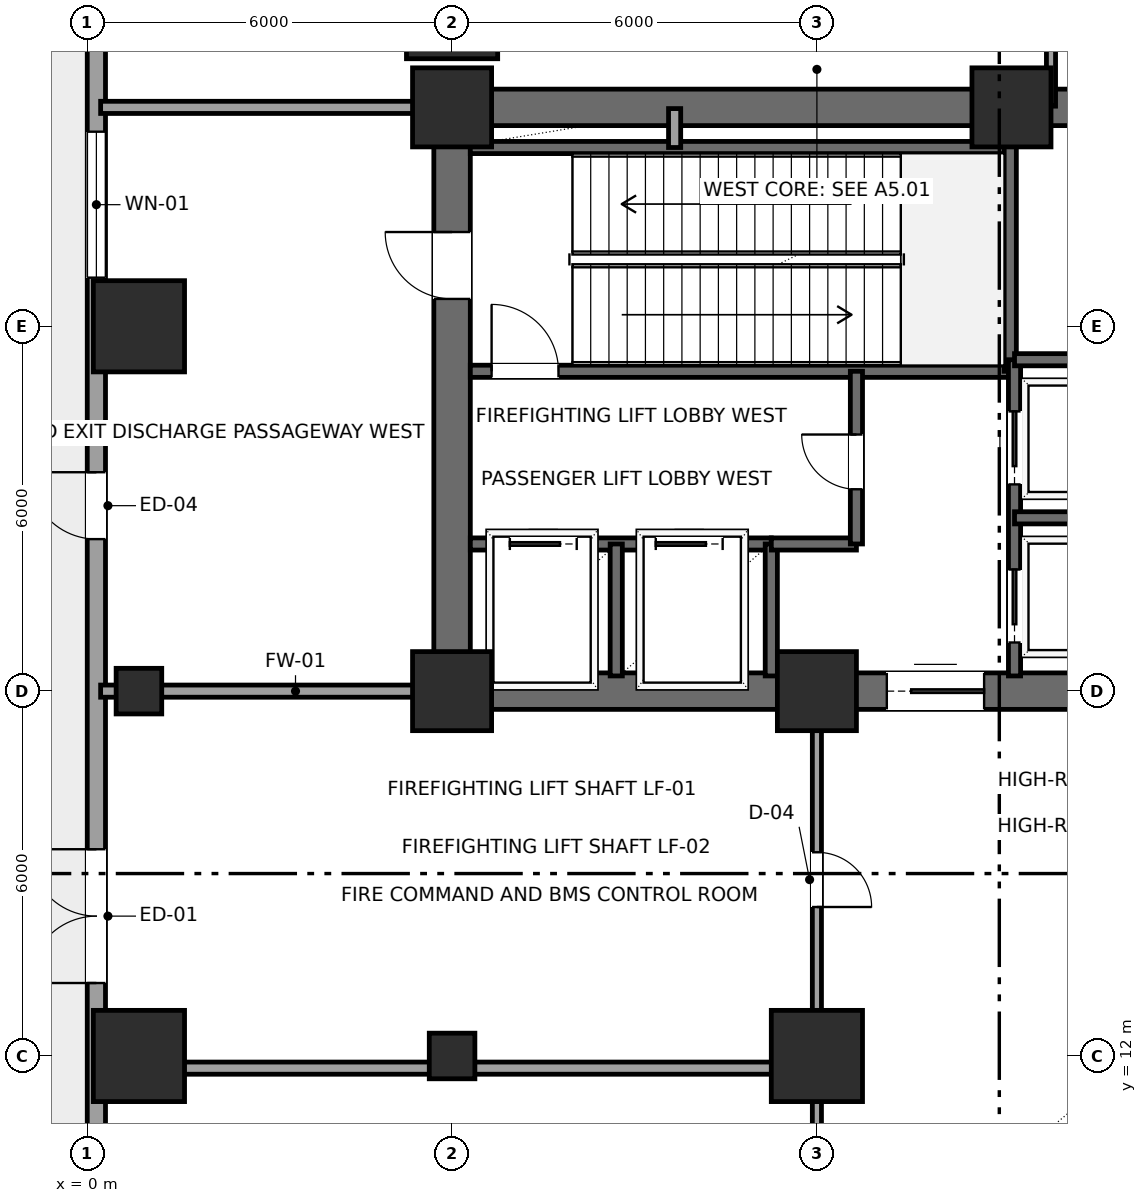
"""IFC4 building model, lengths in metres.
Left out: names, types, materials, properties, quantities, classifications, styles, units other than length and angle.
Written with IfcOpenShell. Run it as: python <this file> out.ifc"""

import sys

from ifc_helpers import new_model, si_unit, direction, frame, frame_2d, origin, origin_2d, place, context, subcontext, project, spatial, rectangle, hollow_rectangle, extrude, element, fill, save


model = new_model("IFC4")
c1 = context("Model", 3, precision=1e-05, world=origin(), true_north=direction((0.0, 1.0)))
c2 = subcontext(c1, "Body", "Model", "MODEL_VIEW")
j1 = project(units=[si_unit("LENGTHUNIT", "METRE"), si_unit("PLANEANGLEUNIT", "RADIAN")], contexts=[c1])
p1 = place(None, origin())
s1 = spatial("IfcSite", under=j1, at=p1, CompositionType="ELEMENT")
p2 = place(p1, origin())
s2 = spatial("IfcBuilding", under=s1, at=p2, CompositionType="ELEMENT")
p3 = place(p2, origin())
s3 = spatial("IfcBuildingStorey", under=s2, at=p3, CompositionType="ELEMENT", Elevation=0.0)
for number, where, z_axis, x_axis in (
    (1, (6.0, 18.0, 0.0), (0.0, 0.0, 1.0), (1.0, 0.0, 0.0)),
    (2, (12.0, 18.0, 0.0), (0.0, 0.0, 1.0), (1.0, 0.0, 0.0)),
    (3, (6.0, 27.6, 0.0), (0.0, 0.0, 1.0), (1.0, 0.0, 0.0)),
    (4, (15.2, 27.6, 0.0), (0.0, 0.0, 1.0), (1.0, 0.0, 0.0)),
):
    element("IfcColumn", number, at=place(p3, frame(where, z_axis=z_axis, x_axis=x_axis)), inside=s3, PredefinedType="COLUMN", context=c2, shape_type="SweptSolid", body=[
        extrude(rectangle(XDim=1.3, YDim=1.3, at=origin_2d()), origin(), (0.0, 0.0, 1.0), 5.7),
    ])
p4 = place(p3, frame((0.85, 12.0, 0.0), z_axis=(0.0, 0.0, 1.0), x_axis=(1.0, 0.0, 0.0)))
e5 = element("IfcColumn", 5, at=p4, inside=s3, PredefinedType="COLUMN", context=c2, shape_type="SweptSolid", body=[
    extrude(rectangle(XDim=1.5, YDim=1.5, at=origin_2d()), origin(), (0.0, 0.0, 1.0), 5.7),
])
p5 = place(p3, frame((0.85, 18.0, 0.0), z_axis=(0.0, 0.0, 1.0), x_axis=(1.0, 0.0, 0.0)))
e6 = element("IfcColumn", 6, at=p5, inside=s3, PredefinedType="COLUMN", context=c2, shape_type="SweptSolid", body=[
    extrude(hollow_rectangle(XDim=0.75, YDim=0.75, WallThickness=0.035, InnerFilletRadius=0.035, OuterFilletRadius=0.05, at=origin_2d()), origin(), (0.0, 0.0, 1.0), 5.7),
])
p6 = place(p3, frame((0.85, 24.0, 0.0), z_axis=(0.0, 0.0, 1.0), x_axis=(1.0, 0.0, 0.0)))
e7 = element("IfcColumn", 7, at=p6, inside=s3, PredefinedType="COLUMN", context=c2, shape_type="SweptSolid", body=[
    extrude(rectangle(XDim=1.5, YDim=1.5, at=origin_2d()), origin(), (0.0, 0.0, 1.0), 5.7),
])
p7 = place(p3, frame((6.0, 12.0, 0.0), z_axis=(0.0, 0.0, 1.0), x_axis=(1.0, 0.0, 0.0)))
e8 = element("IfcColumn", 8, at=p7, inside=s3, PredefinedType="COLUMN", context=c2, shape_type="SweptSolid", body=[
    extrude(hollow_rectangle(XDim=0.75, YDim=0.75, WallThickness=0.035, InnerFilletRadius=0.035, OuterFilletRadius=0.05, at=origin_2d()), origin(), (0.0, 0.0, 1.0), 5.7),
])
for number, where, z_axis, x_axis in (
    (9, (6.0, 29.15, 0.0), (0.0, 0.0, 1.0), (1.0, 0.0, 0.0)),
    (10, (12.0, 12.0, 0.0), (0.0, 0.0, 1.0), (1.0, 0.0, 0.0)),
):
    element("IfcColumn", number, at=place(p3, frame(where, z_axis=z_axis, x_axis=x_axis)), inside=s3, PredefinedType="COLUMN", context=c2, shape_type="SweptSolid", body=[
        extrude(rectangle(XDim=1.5, YDim=1.5, at=origin_2d()), origin(), (0.0, 0.0, 1.0), 5.7),
    ])
p8 = place(p3, frame((0.15, 3.0, 0.0), z_axis=(0.0, 0.0, 1.0), x_axis=(0.0, 1.0, 0.0)))
e11 = element("IfcWall", 11, at=p8, inside=s3, PredefinedType="SOLIDWALL", context=c2, shape_type="SweptSolid", body=[
    extrude(rectangle(XDim=26.295, YDim=0.3, at=frame_2d((13.147, 0.0))), origin(), (0.0, 0.0, 1.0), 5.4),
])
p9 = place(p8, frame((10.2, 0.0, 0.0)))
e12 = element("IfcOpeningElement", 12, at=p9, cuts=e11, PredefinedType="OPENING", context=c2, shape_type="SweptSolid", body=[
    extrude(rectangle(XDim=2.2, YDim=2.6, at=frame_2d((1.1, 1.3))), frame((0.0, 0.16, 0.0), z_axis=(0.0, -1.0, 0.0), x_axis=(1.0, 0.0, 0.0)), (0.0, 0.0, 1.0), 0.32),
])
p10 = place(p8, frame((17.5, 0.0, 0.0)))
e13 = element("IfcOpeningElement", 13, at=p10, cuts=e11, PredefinedType="OPENING", context=c2, shape_type="SweptSolid", body=[
    extrude(rectangle(XDim=1.1, YDim=2.2, at=frame_2d((0.55, 1.1))), frame((0.0, 0.16, 0.0), z_axis=(0.0, -1.0, 0.0), x_axis=(1.0, 0.0, 0.0)), (0.0, 0.0, 1.0), 0.32),
])
p11 = place(p8, frame((21.8, 0.0, 1.0)))
e14 = element("IfcOpeningElement", 14, at=p11, cuts=e11, PredefinedType="OPENING", context=c2, shape_type="SweptSolid", body=[
    extrude(rectangle(XDim=2.4, YDim=2.2, at=frame_2d((1.2, 1.1))), frame((0.0, 0.16, 0.0), z_axis=(0.0, -1.0, 0.0), x_axis=(1.0, 0.0, 0.0)), (0.0, 0.0, 1.0), 0.32),
])
p12 = place(p3, frame((6.0, 18.0, 0.0), z_axis=(0.0, 0.0, 1.0), x_axis=(1.0, 0.0, 0.0)))
e15 = element("IfcWall", 15, at=p12, inside=s3, PredefinedType="SHEAR", context=c2, shape_type="SweptSolid", body=[
    extrude(rectangle(XDim=12.0, YDim=0.6, at=frame_2d((6.0, 0.0))), origin(), (0.0, 0.0, 1.0), 5.4),
])
p13 = place(p12, frame((7.15, 0.0, 0.0)))
e16 = element("IfcOpeningElement", 16, at=p13, cuts=e15, PredefinedType="OPENING", context=c2, shape_type="SweptSolid", body=[
    extrude(rectangle(XDim=1.6, YDim=2.3, at=frame_2d((0.8, 1.15))), frame((0.0, 0.31, 0.0), z_axis=(0.0, -1.0, 0.0), x_axis=(1.0, 0.0, 0.0)), (0.0, 0.0, 1.0), 0.62),
])
p14 = place(p3, frame((6.0, 27.6, 0.0), z_axis=(0.0, 0.0, 1.0), x_axis=(1.0, 0.0, 0.0)))
e17 = element("IfcWall", 17, at=p14, inside=s3, PredefinedType="SHEAR", context=c2, shape_type="SweptSolid", body=[
    extrude(rectangle(XDim=12.0, YDim=0.6, at=frame_2d((6.0, 0.0))), origin(), (0.0, 0.0, 1.0), 5.4),
])
p15 = place(p14, frame((10.2, 0.0, 0.0)))
e18 = element("IfcOpeningElement", 18, at=p15, cuts=e17, PredefinedType="OPENING", context=c2, shape_type="SweptSolid", body=[
    extrude(rectangle(XDim=0.9, YDim=2.15, at=frame_2d((0.45, 1.075))), frame((0.0, 0.31, 0.0), z_axis=(0.0, -1.0, 0.0), x_axis=(1.0, 0.0, 0.0)), (0.0, 0.0, 1.0), 0.62),
])
p16 = place(p3, frame((6.0, 18.0, 0.0), z_axis=(0.0, 0.0, 1.0), x_axis=(0.0, 1.0, 0.0)))
e19 = element("IfcWall", 19, at=p16, inside=s3, PredefinedType="SHEAR", context=c2, shape_type="SweptSolid", body=[
    extrude(rectangle(XDim=9.6, YDim=0.6, at=frame_2d((4.8, 0.0))), origin(), (0.0, 0.0, 1.0), 5.4),
])
p17 = place(p16, frame((6.45, 0.0, 0.0)))
e20 = element("IfcOpeningElement", 20, at=p17, cuts=e19, PredefinedType="OPENING", context=c2, shape_type="SweptSolid", body=[
    extrude(rectangle(XDim=1.1, YDim=2.2, at=frame_2d((0.55, 1.1))), frame((0.0, 0.31, 0.0), z_axis=(0.0, -1.0, 0.0), x_axis=(1.0, 0.0, 0.0)), (0.0, 0.0, 1.0), 0.62),
])
p18 = place(p3, frame((6.3, 23.26, 0.0), z_axis=(0.0, 0.0, 1.0), x_axis=(1.0, 0.0, 0.0)))
e21 = element("IfcWall", 21, at=p18, inside=s3, PredefinedType="SHEAR", context=c2, shape_type="SweptSolid", body=[
    extrude(rectangle(XDim=8.88, YDim=0.2, at=frame_2d((4.44, 0.0))), origin(), (0.0, 0.0, 1.0), 5.4),
])
p19 = place(p18, frame((0.35, 0.0, 0.0)))
e22 = element("IfcOpeningElement", 22, at=p19, cuts=e21, PredefinedType="OPENING", context=c2, shape_type="SweptSolid", body=[
    extrude(rectangle(XDim=1.1, YDim=2.2, at=frame_2d((0.55, 1.1))), frame((0.0, 0.11, 0.0), z_axis=(0.0, -1.0, 0.0), x_axis=(1.0, 0.0, 0.0)), (0.0, 0.0, 1.0), 0.22),
])
p20 = place(p3, frame((6.3, 26.94, 0.0), z_axis=(0.0, 0.0, 1.0), x_axis=(1.0, 0.0, 0.0)))
e23 = element("IfcWall", 23, at=p20, inside=s3, PredefinedType="SHEAR", context=c2, shape_type="SweptSolid", body=[
    extrude(rectangle(XDim=8.88, YDim=0.2, at=frame_2d((4.44, 0.0))), origin(), (0.0, 0.0, 1.0), 5.4),
])
p21 = place(p3, frame((15.18, 23.26, 0.0), z_axis=(0.0, 0.0, 1.0), x_axis=(0.0, 1.0, 0.0)))
e24 = element("IfcWall", 24, at=p21, inside=s3, PredefinedType="SHEAR", context=c2, shape_type="SweptSolid", body=[
    extrude(rectangle(XDim=4.04, YDim=0.2, at=frame_2d((2.02, 0.0))), origin(), (0.0, 0.0, 1.0), 5.4),
])
p22 = place(p3, frame((6.3, 20.42, 0.0), z_axis=(0.0, 0.0, 1.0), x_axis=(1.0, 0.0, 0.0)))
e25 = element("IfcWall", 25, at=p22, inside=s3, PredefinedType="SHEAR", context=c2, shape_type="SweptSolid", body=[
    extrude(rectangle(XDim=4.95, YDim=0.2, at=frame_2d((2.475, 0.0))), origin(), (0.0, 0.0, 1.0), 5.4),
])
p23 = place(p22, frame((0.65, 0.0, 0.0)))
e26 = element("IfcOpeningElement", 26, at=p23, cuts=e25, PredefinedType="OPENING", context=c2, shape_type="SweptSolid", body=[
    extrude(rectangle(XDim=1.1, YDim=2.2, at=frame_2d((0.55, 1.1))), frame((0.0, 0.11, 0.0), z_axis=(0.0, -1.0, 0.0), x_axis=(1.0, 0.0, 0.0)), (0.0, 0.0, 1.0), 0.22),
])
p24 = place(p22, frame((3.05, 0.0, 0.0)))
e27 = element("IfcOpeningElement", 27, at=p24, cuts=e25, PredefinedType="OPENING", context=c2, shape_type="SweptSolid", body=[
    extrude(rectangle(XDim=1.1, YDim=2.2, at=frame_2d((0.55, 1.1))), frame((0.0, 0.11, 0.0), z_axis=(0.0, -1.0, 0.0), x_axis=(1.0, 0.0, 0.0)), (0.0, 0.0, 1.0), 0.22),
])
for number, where, z_axis, x_axis in (
    (28, (8.7, 18.25, 0.0), (0.0, 0.0, 1.0), (0.0, 1.0, 0.0)),
    (29, (11.25, 18.25, 0.0), (0.0, 0.0, 1.0), (0.0, 1.0, 0.0)),
):
    element("IfcWall", number, at=place(p3, frame(where, z_axis=z_axis, x_axis=x_axis)), inside=s3, PredefinedType="SHEAR", context=c2, shape_type="SweptSolid", body=[
        extrude(rectangle(XDim=2.17, YDim=0.2, at=frame_2d((1.085, 0.0))), origin(), (0.0, 0.0, 1.0), 5.4),
    ])
p25 = place(p3, frame((11.25, 20.42, 0.0), z_axis=(0.0, 0.0, 1.0), x_axis=(1.0, 0.0, 0.0)))
e30 = element("IfcWall", 30, at=p25, inside=s3, PredefinedType="SHEAR", context=c2, shape_type="SweptSolid", body=[
    extrude(rectangle(XDim=1.4, YDim=0.2, at=frame_2d((0.7, 0.0))), origin(), (0.0, 0.0, 1.0), 5.4),
])
p26 = place(p3, frame((12.65, 20.42, 0.0), z_axis=(0.0, 0.0, 1.0), x_axis=(0.0, 1.0, 0.0)))
e31 = element("IfcWall", 31, at=p26, inside=s3, PredefinedType="SHEAR", context=c2, shape_type="SweptSolid", body=[
    extrude(rectangle(XDim=2.84, YDim=0.2, at=frame_2d((1.42, 0.0))), origin(), (0.0, 0.0, 1.0), 5.4),
])
p27 = place(p26, frame((0.9, 0.0, 0.0)))
e32 = element("IfcOpeningElement", 32, at=p27, cuts=e31, PredefinedType="OPENING", context=c2, shape_type="SweptSolid", body=[
    extrude(rectangle(XDim=0.9, YDim=2.15, at=frame_2d((0.45, 1.075))), frame((0.0, 0.11, 0.0), z_axis=(0.0, -1.0, 0.0), x_axis=(1.0, 0.0, 0.0)), (0.0, 0.0, 1.0), 0.22),
])
p28 = place(p3, frame((9.66, 26.94, 0.0), z_axis=(0.0, 0.0, 1.0), x_axis=(0.0, 1.0, 0.0)))
e33 = element("IfcWall", 33, at=p28, inside=s3, PredefinedType="SOLIDWALL", context=c2, shape_type="SweptSolid", body=[
    extrude(rectangle(XDim=0.64, YDim=0.2, at=frame_2d((0.32, 0.0))), origin(), (0.0, 0.0, 1.0), 5.4),
])
p29 = place(p3, frame((15.25, 18.25, 0.0), z_axis=(0.0, 0.0, 1.0), x_axis=(0.0, 1.0, 0.0)))
e34 = element("IfcWall", 34, at=p29, inside=s3, PredefinedType="SHEAR", context=c2, shape_type="SweptSolid", body=[
    extrude(rectangle(XDim=5.2, YDim=0.2, at=frame_2d((2.6, 0.0))), origin(), (0.0, 0.0, 1.0), 5.4),
])
p30 = place(p29, frame((0.55, 0.0, 0.0)))
e35 = element("IfcOpeningElement", 35, at=p30, cuts=e34, PredefinedType="OPENING", context=c2, shape_type="SweptSolid", body=[
    extrude(rectangle(XDim=1.2, YDim=2.2, at=frame_2d((0.6, 1.1))), frame((0.0, 0.11, 0.0), z_axis=(0.0, -1.0, 0.0), x_axis=(1.0, 0.0, 0.0)), (0.0, 0.0, 1.0), 0.22),
])
p31 = place(p29, frame((3.15, 0.0, 0.0)))
e36 = element("IfcOpeningElement", 36, at=p31, cuts=e34, PredefinedType="OPENING", context=c2, shape_type="SweptSolid", body=[
    extrude(rectangle(XDim=1.2, YDim=2.2, at=frame_2d((0.6, 1.1))), frame((0.0, 0.11, 0.0), z_axis=(0.0, -1.0, 0.0), x_axis=(1.0, 0.0, 0.0)), (0.0, 0.0, 1.0), 0.22),
])
p32 = place(p3, frame((15.25, 20.85, 0.0), z_axis=(0.0, 0.0, 1.0), x_axis=(1.0, 0.0, 0.0)))
e37 = element("IfcWall", 37, at=p32, inside=s3, PredefinedType="SHEAR", context=c2, shape_type="SweptSolid", body=[
    extrude(rectangle(XDim=2.4, YDim=0.2, at=frame_2d((1.2, 0.0))), origin(), (0.0, 0.0, 1.0), 5.4),
])
p33 = place(p3, frame((15.25, 23.45, 0.0), z_axis=(0.0, 0.0, 1.0), x_axis=(1.0, 0.0, 0.0)))
e38 = element("IfcWall", 38, at=p33, inside=s3, PredefinedType="SHEAR", context=c2, shape_type="SweptSolid", body=[
    extrude(rectangle(XDim=2.45, YDim=0.2, at=frame_2d((1.225, 0.0))), origin(), (0.0, 0.0, 1.0), 5.4),
])
p34 = place(p3, frame((0.22, 18.0, 0.0), z_axis=(0.0, 0.0, 1.0), x_axis=(1.0, 0.0, 0.0)))
e39 = element("IfcWall", 39, at=p34, inside=s3, PredefinedType="SOLIDWALL", context=c2, shape_type="SweptSolid", body=[
    extrude(rectangle(XDim=5.78, YDim=0.2, at=frame_2d((2.89, 0.0))), origin(), (0.0, 0.0, 1.0), 4.742),
])
p35 = place(p3, frame((0.22, 27.6, 0.0), z_axis=(0.0, 0.0, 1.0), x_axis=(1.0, 0.0, 0.0)))
e40 = element("IfcWall", 40, at=p35, inside=s3, PredefinedType="SOLIDWALL", context=c2, shape_type="SweptSolid", body=[
    extrude(rectangle(XDim=5.78, YDim=0.2, at=frame_2d((2.89, 0.0))), origin(), (0.0, 0.0, 1.0), 5.4),
])
p36 = place(p3, frame((12.0, 17.96, 0.0), z_axis=(0.0, 0.0, 1.0), x_axis=(0.0, -1.0, 0.0)))
e41 = element("IfcWall", 41, at=p36, inside=s3, PredefinedType="PARTITIONING", context=c2, shape_type="SweptSolid", body=[
    extrude(rectangle(XDim=17.74, YDim=0.15, at=frame_2d((8.87, 0.0))), origin(), (0.0, 0.0, 1.0), 3.492),
])
p37 = place(p36, frame((2.61, 0.0, 0.0)))
e42 = element("IfcOpeningElement", 42, at=p37, cuts=e41, PredefinedType="OPENING", context=c2, shape_type="SweptSolid", body=[
    extrude(rectangle(XDim=0.9, YDim=2.15, at=frame_2d((0.45, 1.075))), frame((0.0, 0.085, 0.0), z_axis=(0.0, -1.0, 0.0), x_axis=(1.0, 0.0, 0.0)), (0.0, 0.0, 1.0), 0.17),
])
p38 = place(p36, frame((10.135, 0.0, 0.0)))
e43 = element("IfcOpeningElement", 43, at=p38, cuts=e41, PredefinedType="OPENING", context=c2, shape_type="SweptSolid", body=[
    extrude(rectangle(XDim=0.95, YDim=2.15, at=frame_2d((0.475, 1.075))), frame((0.0, 0.085, 0.0), z_axis=(0.0, -1.0, 0.0), x_axis=(1.0, 0.0, 0.0)), (0.0, 0.0, 1.0), 0.17),
])
p39 = place(p3, frame((15.85, 27.62, 0.0), z_axis=(0.0, 0.0, 1.0), x_axis=(0.0, 1.0, 0.0)))
e44 = element("IfcWall", 44, at=p39, inside=s3, PredefinedType="PARTITIONING", context=c2, shape_type="SweptSolid", body=[
    extrude(rectangle(XDim=2.58, YDim=0.15, at=frame_2d((1.29, 0.0))), origin(), (0.0, 0.0, 1.0), 5.4),
])
p40 = place(p3, frame((0.22, 11.8, 0.0), z_axis=(0.0, 0.0, 1.0), x_axis=(1.0, 0.0, 0.0)))
e45 = element("IfcWall", 45, at=p40, inside=s3, PredefinedType="SOLIDWALL", context=c2, shape_type="SweptSolid", body=[
    extrude(rectangle(XDim=11.78, YDim=0.2, at=frame_2d((5.89, 0.0))), origin(), (0.0, 0.0, 1.0), 4.742),
])
p41 = place(p9, origin())
e46 = element("IfcDoor", 46, at=p41, inside=s3, OperationType="DOUBLE_DOOR_SINGLE_SWING", PredefinedType="DOOR", context=c2, shape_type="SweptSolid", body=[
    extrude(rectangle(XDim=2.2, YDim=2.6, at=frame_2d((1.1, 1.3))), frame((0.0, 0.025, 0.0), z_axis=(0.0, -1.0, 0.0), x_axis=(1.0, 0.0, 0.0)), (0.0, 0.0, 1.0), 0.05),
])
fill(e12, e46)
p42 = place(p10, origin())
e47 = element("IfcDoor", 47, at=p42, inside=s3, OperationType="SINGLE_SWING_RIGHT", PredefinedType="DOOR", context=c2, shape_type="SweptSolid", body=[
    extrude(rectangle(XDim=1.1, YDim=2.2, at=frame_2d((0.55, 1.1))), frame((0.0, 0.025, 0.0), z_axis=(0.0, -1.0, 0.0), x_axis=(1.0, 0.0, 0.0)), (0.0, 0.0, 1.0), 0.05),
])
fill(e13, e47)
p43 = place(p11, origin())
e48 = element("IfcWindow", 48, at=p43, inside=s3, PartitioningType="SINGLE_PANEL", PredefinedType="WINDOW", context=c2, shape_type="SweptSolid", body=[
    extrude(rectangle(XDim=2.4, YDim=2.2, at=frame_2d((1.2, 1.1))), frame((0.0, 0.03, 0.0), z_axis=(0.0, -1.0, 0.0), x_axis=(1.0, 0.0, 0.0)), (0.0, 0.0, 1.0), 0.06),
])
fill(e14, e48)
p44 = place(p13, origin())
e49 = element("IfcDoor", 49, at=p44, inside=s3, OperationType="DOUBLE_DOOR_SLIDING", PredefinedType="DOOR", context=c2, shape_type="SweptSolid", body=[
    extrude(rectangle(XDim=1.6, YDim=2.3, at=frame_2d((0.8, 1.15))), frame((0.0, 0.025, 0.0), z_axis=(0.0, -1.0, 0.0), x_axis=(1.0, 0.0, 0.0)), (0.0, 0.0, 1.0), 0.05),
])
fill(e16, e49)
p45 = place(p17, origin())
e50 = element("IfcDoor", 50, at=p45, inside=s3, OperationType="SINGLE_SWING_RIGHT", PredefinedType="DOOR", context=c2, shape_type="SweptSolid", body=[
    extrude(rectangle(XDim=1.1, YDim=2.2, at=frame_2d((0.55, 1.1))), frame((0.0, 0.025, 0.0), z_axis=(0.0, -1.0, 0.0), x_axis=(1.0, 0.0, 0.0)), (0.0, 0.0, 1.0), 0.05),
])
fill(e20, e50)
p46 = place(p19, origin())
e51 = element("IfcDoor", 51, at=p46, inside=s3, OperationType="SINGLE_SWING_LEFT", PredefinedType="DOOR", context=c2, shape_type="SweptSolid", body=[
    extrude(rectangle(XDim=1.1, YDim=2.2, at=frame_2d((0.55, 1.1))), frame((0.0, 0.025, 0.0), z_axis=(0.0, -1.0, 0.0), x_axis=(1.0, 0.0, 0.0)), (0.0, 0.0, 1.0), 0.05),
])
fill(e22, e51)
p47 = place(p23, origin())
e52 = element("IfcDoor", 52, at=p47, inside=s3, OperationType="SLIDING_TO_LEFT", PredefinedType="DOOR", context=c2, shape_type="SweptSolid", body=[
    extrude(rectangle(XDim=1.1, YDim=2.2, at=frame_2d((0.55, 1.1))), frame((0.0, 0.025, 0.0), z_axis=(0.0, -1.0, 0.0), x_axis=(1.0, 0.0, 0.0)), (0.0, 0.0, 1.0), 0.05),
])
fill(e26, e52)
p48 = place(p24, origin())
e53 = element("IfcDoor", 53, at=p48, inside=s3, OperationType="SLIDING_TO_LEFT", PredefinedType="DOOR", context=c2, shape_type="SweptSolid", body=[
    extrude(rectangle(XDim=1.1, YDim=2.2, at=frame_2d((0.55, 1.1))), frame((0.0, 0.025, 0.0), z_axis=(0.0, -1.0, 0.0), x_axis=(1.0, 0.0, 0.0)), (0.0, 0.0, 1.0), 0.05),
])
fill(e27, e53)
p49 = place(p27, origin())
e54 = element("IfcDoor", 54, at=p49, inside=s3, OperationType="SINGLE_SWING_RIGHT", PredefinedType="DOOR", context=c2, shape_type="SweptSolid", body=[
    extrude(rectangle(XDim=0.9, YDim=2.15, at=frame_2d((0.45, 1.075))), frame((0.0, 0.025, 0.0), z_axis=(0.0, -1.0, 0.0), x_axis=(1.0, 0.0, 0.0)), (0.0, 0.0, 1.0), 0.05),
])
fill(e32, e54)
p50 = place(p30, origin())
e55 = element("IfcDoor", 55, at=p50, inside=s3, OperationType="SLIDING_TO_RIGHT", PredefinedType="DOOR", context=c2, shape_type="SweptSolid", body=[
    extrude(rectangle(XDim=1.2, YDim=2.2, at=frame_2d((0.6, 1.1))), frame((0.0, 0.025, 0.0), z_axis=(0.0, -1.0, 0.0), x_axis=(1.0, 0.0, 0.0)), (0.0, 0.0, 1.0), 0.05),
])
fill(e35, e55)
p51 = place(p31, origin())
e56 = element("IfcDoor", 56, at=p51, inside=s3, OperationType="SLIDING_TO_RIGHT", PredefinedType="DOOR", context=c2, shape_type="SweptSolid", body=[
    extrude(rectangle(XDim=1.2, YDim=2.2, at=frame_2d((0.6, 1.1))), frame((0.0, 0.025, 0.0), z_axis=(0.0, -1.0, 0.0), x_axis=(1.0, 0.0, 0.0)), (0.0, 0.0, 1.0), 0.05),
])
fill(e36, e56)
p52 = place(p37, origin())
e57 = element("IfcDoor", 57, at=p52, inside=s3, OperationType="SINGLE_SWING_RIGHT", PredefinedType="DOOR", context=c2, shape_type="SweptSolid", body=[
    extrude(rectangle(XDim=0.9, YDim=2.15, at=frame_2d((0.45, 1.075))), frame((0.0, 0.025, 0.0), z_axis=(0.0, -1.0, 0.0), x_axis=(1.0, 0.0, 0.0)), (0.0, 0.0, 1.0), 0.05),
])
fill(e42, e57)
save(model, sys.argv[1])
